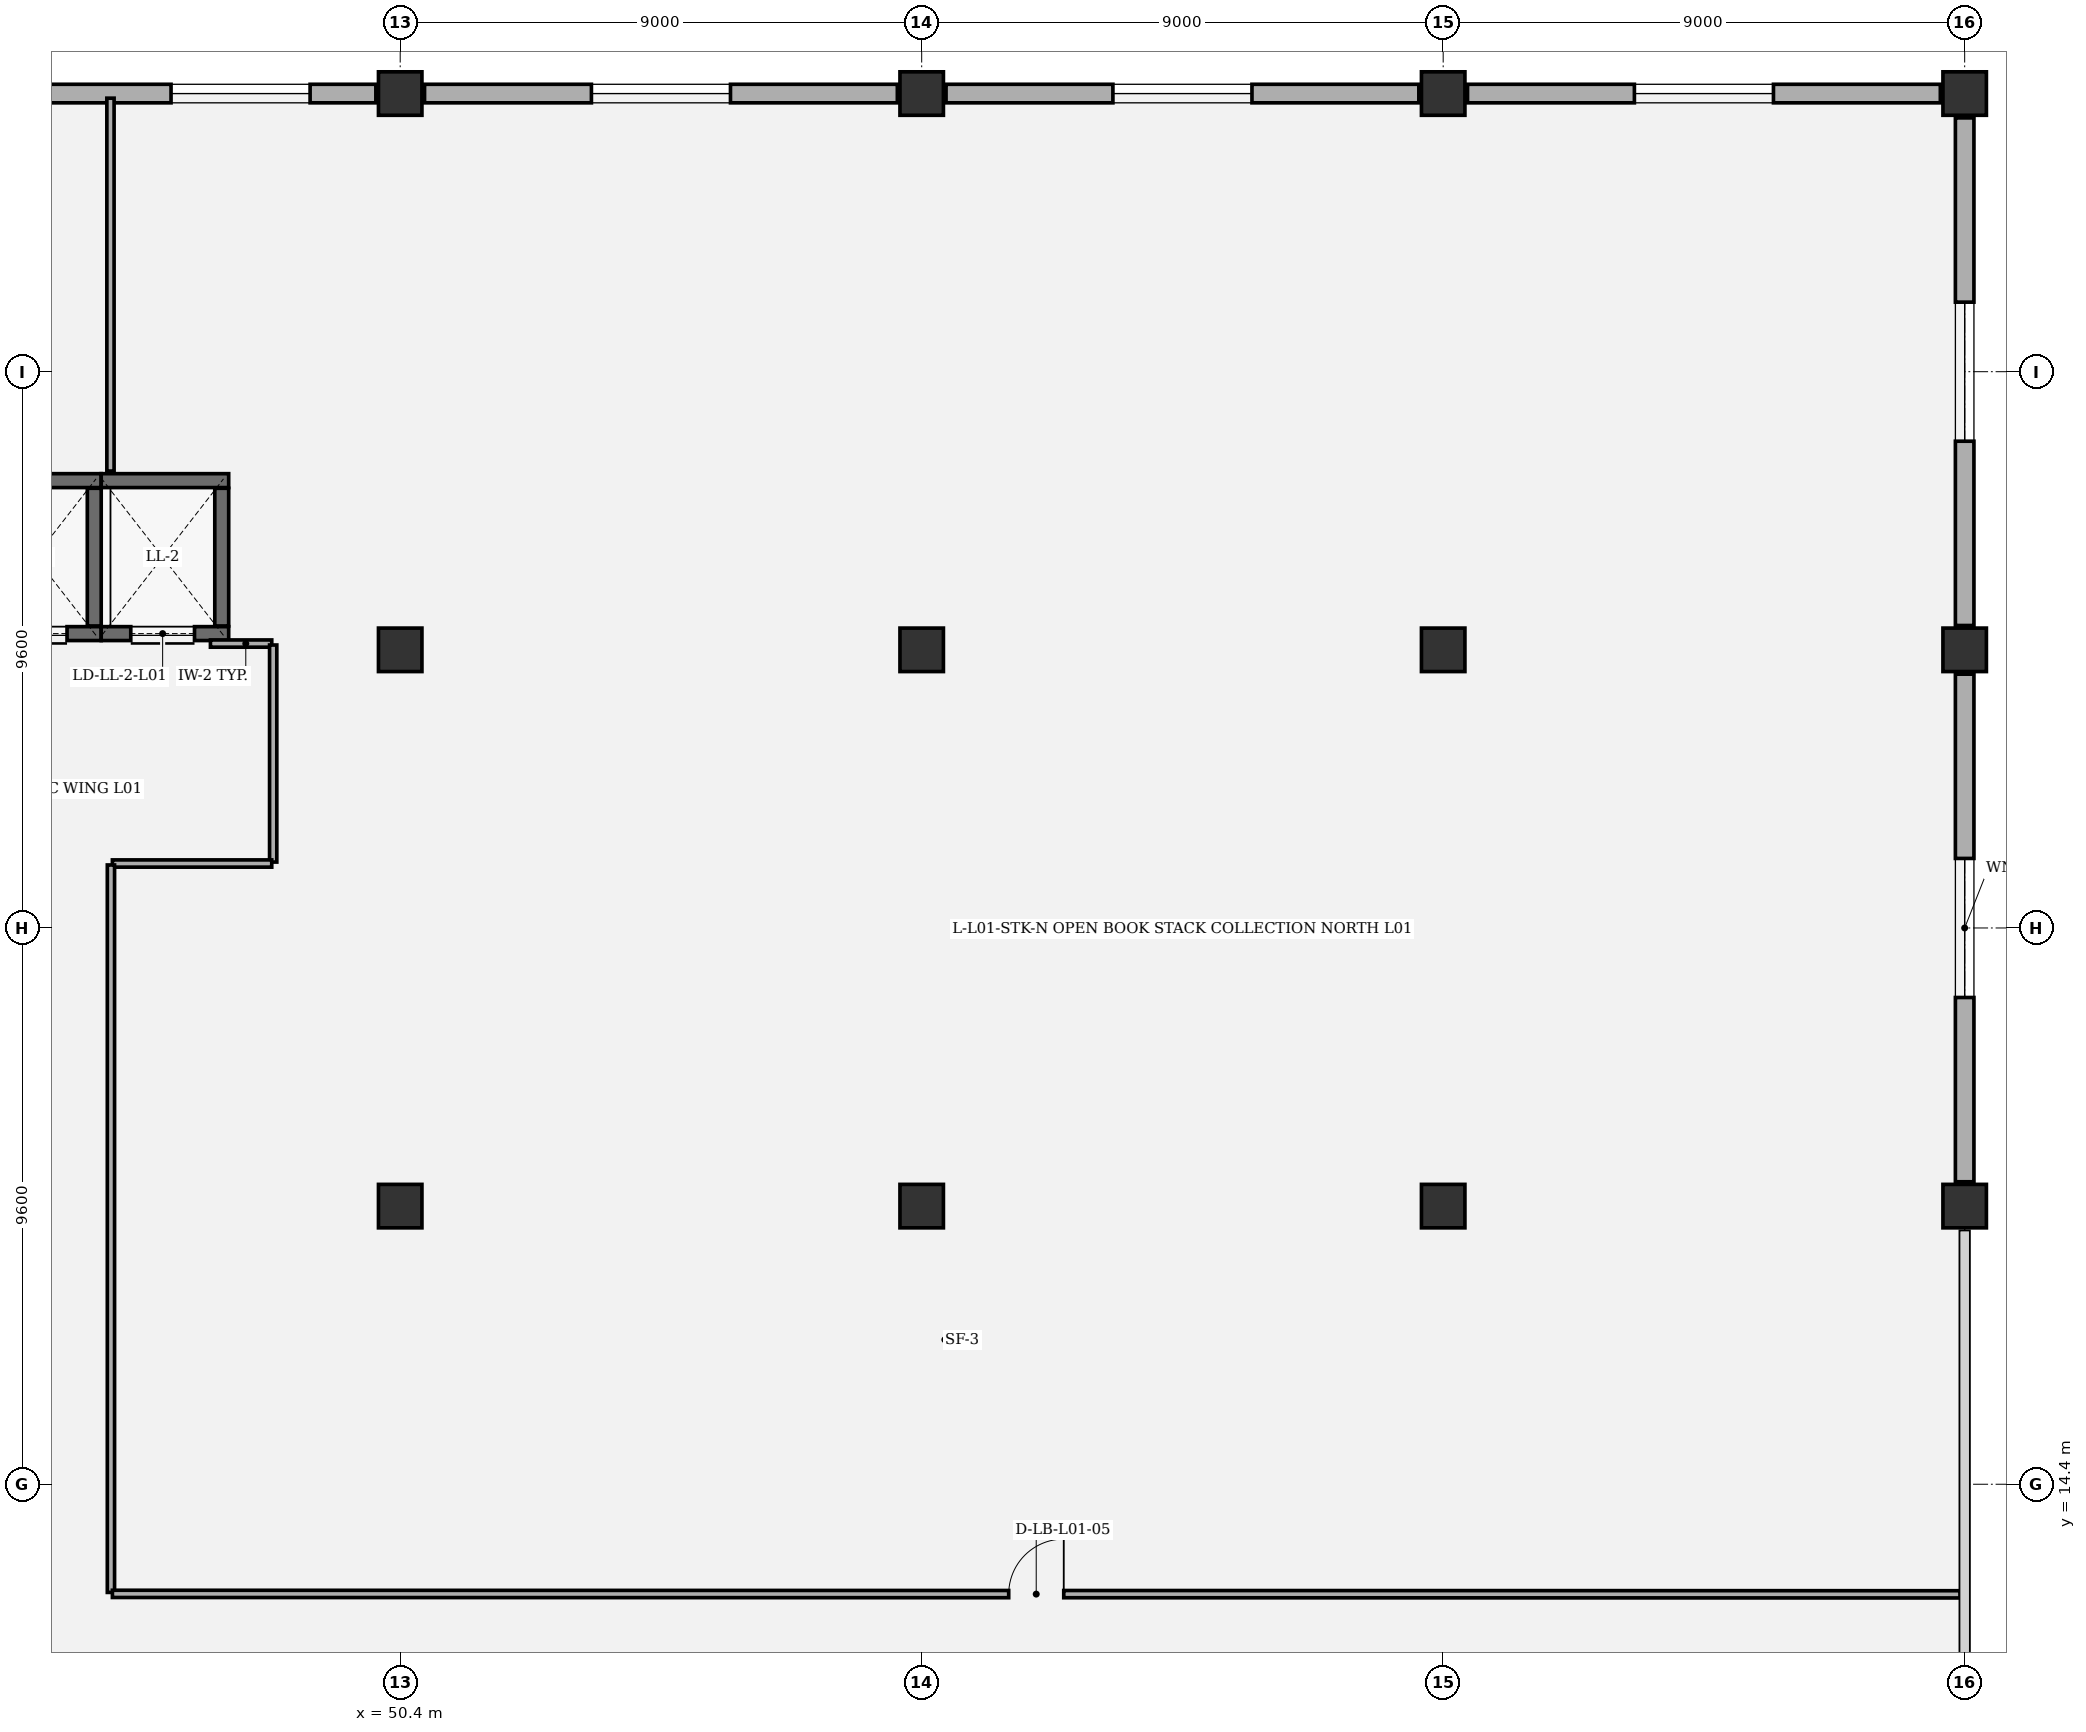
"""IFC4 building model, lengths in metres.
Left out: names, types, materials, properties, quantities, classifications, styles, units other than length and angle.
Written with IfcOpenShell. Run it as: python <this file> out.ifc"""

import sys

from ifc_helpers import new_model, si_unit, direction, frame, frame_2d, origin, origin_2d, place, context, subcontext, project, spatial, rectangle, extrude, element, fill, save


model = new_model("IFC4")
c1 = context("Model", 3, precision=1e-05, world=origin(), true_north=direction((0.0, 1.0)))
c2 = subcontext(c1, "Body", "Model", "MODEL_VIEW")
j1 = project(units=[si_unit("LENGTHUNIT", "METRE"), si_unit("PLANEANGLEUNIT", "RADIAN")], contexts=[c1])
p1 = place(None, origin())
s1 = spatial("IfcSite", under=j1, at=p1, CompositionType="ELEMENT")
p2 = place(p1, origin())
s2 = spatial("IfcBuilding", under=s1, at=p2, CompositionType="ELEMENT")
p3 = place(p2, frame((0.0, 0.0, 6.6)))
s3 = spatial("IfcBuildingStorey", under=s2, at=p3, CompositionType="ELEMENT", Elevation=6.6)
for number, where, z_axis, x_axis in (
    (1, (50.4, 19.2, 0.0), (0.0, 0.0, 1.0), (1.0, 0.0, 0.0)),
    (2, (50.4, 28.8, 0.0), (0.0, 0.0, 1.0), (1.0, 0.0, 0.0)),
    (3, (50.4, 38.4, 0.0), (0.0, 0.0, 1.0), (1.0, 0.0, 0.0)),
    (4, (59.4, 19.2, 0.0), (0.0, 0.0, 1.0), (1.0, 0.0, 0.0)),
    (5, (59.4, 28.8, 0.0), (0.0, 0.0, 1.0), (1.0, 0.0, 0.0)),
    (6, (59.4, 38.4, 0.0), (0.0, 0.0, 1.0), (1.0, 0.0, 0.0)),
    (7, (68.4, 19.2, 0.0), (0.0, 0.0, 1.0), (1.0, 0.0, 0.0)),
    (8, (68.4, 28.8, 0.0), (0.0, 0.0, 1.0), (1.0, 0.0, 0.0)),
    (9, (68.4, 38.4, 0.0), (0.0, 0.0, 1.0), (1.0, 0.0, 0.0)),
    (10, (77.4, 19.2, 0.0), (0.0, 0.0, 1.0), (1.0, 0.0, 0.0)),
    (11, (77.4, 28.8, 0.0), (0.0, 0.0, 1.0), (1.0, 0.0, 0.0)),
    (12, (77.4, 38.4, 0.0), (0.0, 0.0, 1.0), (1.0, 0.0, 0.0)),
):
    element("IfcColumn", number, at=place(p3, frame(where, z_axis=z_axis, x_axis=x_axis)), inside=s3, PredefinedType="COLUMN", context=c2, shape_type="SweptSolid", body=[
        extrude(rectangle(XDim=0.75, YDim=0.75, at=origin_2d()), origin(), (0.0, 0.0, 1.0), 5.4),
    ])
p4 = place(p3, frame((77.4, 28.38, 0.0), z_axis=(0.0, 0.0, 1.0), x_axis=(0.0, -1.0, 0.0)))
e13 = element("IfcWall", 13, at=p4, inside=s3, PredefinedType="SOLIDWALL", context=c2, shape_type="SweptSolid", body=[
    extrude(rectangle(XDim=8.76, YDim=0.32, at=frame_2d((4.38, 0.0))), origin(), (0.0, 0.0, 1.0), 4.337),
])
p5 = place(p4, frame((3.18, 0.0, 0.8)))
e14 = element("IfcOpeningElement", 14, at=p5, cuts=e13, PredefinedType="OPENING", context=c2, shape_type="SweptSolid", body=[
    extrude(rectangle(XDim=2.4, YDim=1.65, at=frame_2d((1.2, 0.825))), frame((0.0, 0.17, 0.0), z_axis=(0.0, -1.0, 0.0), x_axis=(1.0, 0.0, 0.0)), (0.0, 0.0, 1.0), 0.34),
])
p6 = place(p3, frame((77.4, 37.98, 0.0), z_axis=(0.0, 0.0, 1.0), x_axis=(0.0, -1.0, 0.0)))
e15 = element("IfcWall", 15, at=p6, inside=s3, PredefinedType="SOLIDWALL", context=c2, shape_type="SweptSolid", body=[
    extrude(rectangle(XDim=8.76, YDim=0.32, at=frame_2d((4.38, 0.0))), origin(), (0.0, 0.0, 1.0), 4.337),
])
p7 = place(p6, frame((3.18, 0.0, 0.8)))
e16 = element("IfcOpeningElement", 16, at=p7, cuts=e15, PredefinedType="OPENING", context=c2, shape_type="SweptSolid", body=[
    extrude(rectangle(XDim=2.4, YDim=1.65, at=frame_2d((1.2, 0.825))), frame((0.0, 0.17, 0.0), z_axis=(0.0, -1.0, 0.0), x_axis=(1.0, 0.0, 0.0)), (0.0, 0.0, 1.0), 0.34),
])
p8 = place(p3, frame((68.82, 38.4, 0.0), z_axis=(0.0, 0.0, 1.0), x_axis=(1.0, 0.0, 0.0)))
e17 = element("IfcWall", 17, at=p8, inside=s3, PredefinedType="SOLIDWALL", context=c2, shape_type="SweptSolid", body=[
    extrude(rectangle(XDim=8.16, YDim=0.32, at=frame_2d((4.08, 0.0))), origin(), (0.0, 0.0, 1.0), 4.337),
])
p9 = place(p8, frame((2.88, 0.0, 0.8)))
e18 = element("IfcOpeningElement", 18, at=p9, cuts=e17, PredefinedType="OPENING", context=c2, shape_type="SweptSolid", body=[
    extrude(rectangle(XDim=2.4, YDim=1.65, at=frame_2d((1.2, 0.825))), frame((0.0, 0.17, 0.0), z_axis=(0.0, -1.0, 0.0), x_axis=(1.0, 0.0, 0.0)), (0.0, 0.0, 1.0), 0.34),
])
p10 = place(p3, frame((59.82, 38.4, 0.0), z_axis=(0.0, 0.0, 1.0), x_axis=(1.0, 0.0, 0.0)))
e19 = element("IfcWall", 19, at=p10, inside=s3, PredefinedType="SOLIDWALL", context=c2, shape_type="SweptSolid", body=[
    extrude(rectangle(XDim=8.16, YDim=0.32, at=frame_2d((4.08, 0.0))), origin(), (0.0, 0.0, 1.0), 4.337),
])
p11 = place(p10, frame((2.88, 0.0, 0.8)))
e20 = element("IfcOpeningElement", 20, at=p11, cuts=e19, PredefinedType="OPENING", context=c2, shape_type="SweptSolid", body=[
    extrude(rectangle(XDim=2.4, YDim=1.65, at=frame_2d((1.2, 0.825))), frame((0.0, 0.17, 0.0), z_axis=(0.0, -1.0, 0.0), x_axis=(1.0, 0.0, 0.0)), (0.0, 0.0, 1.0), 0.34),
])
p12 = place(p3, frame((50.82, 38.4, 0.0), z_axis=(0.0, 0.0, 1.0), x_axis=(1.0, 0.0, 0.0)))
e21 = element("IfcWall", 21, at=p12, inside=s3, PredefinedType="SOLIDWALL", context=c2, shape_type="SweptSolid", body=[
    extrude(rectangle(XDim=8.16, YDim=0.32, at=frame_2d((4.08, 0.0))), origin(), (0.0, 0.0, 1.0), 4.337),
])
p13 = place(p12, frame((2.88, 0.0, 0.8)))
e22 = element("IfcOpeningElement", 22, at=p13, cuts=e21, PredefinedType="OPENING", context=c2, shape_type="SweptSolid", body=[
    extrude(rectangle(XDim=2.4, YDim=1.65, at=frame_2d((1.2, 0.825))), frame((0.0, 0.17, 0.0), z_axis=(0.0, -1.0, 0.0), x_axis=(1.0, 0.0, 0.0)), (0.0, 0.0, 1.0), 0.34),
])
p14 = place(p3, frame((41.82, 38.4, 0.0), z_axis=(0.0, 0.0, 1.0), x_axis=(1.0, 0.0, 0.0)))
e23 = element("IfcWall", 23, at=p14, inside=s3, PredefinedType="SOLIDWALL", context=c2, shape_type="SweptSolid", body=[
    extrude(rectangle(XDim=8.16, YDim=0.32, at=frame_2d((4.08, 0.0))), origin(), (0.0, 0.0, 1.0), 4.337),
])
p15 = place(p14, frame((4.625, 0.0, 0.8)))
e24 = element("IfcOpeningElement", 24, at=p15, cuts=e23, PredefinedType="OPENING", context=c2, shape_type="SweptSolid", body=[
    extrude(rectangle(XDim=2.4, YDim=1.65, at=frame_2d((1.2, 0.825))), frame((0.0, 0.17, 0.0), z_axis=(0.0, -1.0, 0.0), x_axis=(1.0, 0.0, 0.0)), (0.0, 0.0, 1.0), 0.34),
])
p16 = place(p3, frame((45.24, 29.08, 0.0), z_axis=(0.0, 0.0, 1.0), x_axis=(-1.0, 0.0, 0.0)))
e25 = element("IfcWall", 25, at=p16, inside=s3, PredefinedType="SHEAR", context=c2, shape_type="SweptSolid", body=[
    extrude(rectangle(XDim=2.28, YDim=0.24, at=frame_2d((1.14, 0.0))), origin(), (0.0, 0.0, 1.0), 5.14),
])
p17 = place(p16, frame((0.59, 0.0, 0.0)))
e26 = element("IfcOpeningElement", 26, at=p17, cuts=e25, PredefinedType="OPENING", context=c2, shape_type="SweptSolid", body=[
    extrude(rectangle(XDim=1.1, YDim=2.2, at=frame_2d((0.55, 1.1))), frame((0.0, 0.13, 0.0), z_axis=(0.0, -1.0, 0.0), x_axis=(1.0, 0.0, 0.0)), (0.0, 0.0, 1.0), 0.26),
])
p18 = place(p3, frame((42.96, 31.72, 0.0), z_axis=(0.0, 0.0, 1.0), x_axis=(1.0, 0.0, 0.0)))
e27 = element("IfcWall", 27, at=p18, inside=s3, PredefinedType="SHEAR", context=c2, shape_type="SweptSolid", body=[
    extrude(rectangle(XDim=2.28, YDim=0.24, at=frame_2d((1.14, 0.0))), origin(), (0.0, 0.0, 1.0), 5.14),
])
p19 = place(p3, frame((45.12, 31.588, 0.0), z_axis=(0.0, 0.0, 1.0), x_axis=(0.0, -1.0, 0.0)))
e28 = element("IfcWall", 28, at=p19, inside=s3, PredefinedType="SHEAR", context=c2, shape_type="SweptSolid", body=[
    extrude(rectangle(XDim=2.376, YDim=0.24, at=frame_2d((1.188, 0.0))), origin(), (0.0, 0.0, 1.0), 5.14),
])
p20 = place(p3, frame((47.44, 29.08, 0.0), z_axis=(0.0, 0.0, 1.0), x_axis=(-1.0, 0.0, 0.0)))
e29 = element("IfcWall", 29, at=p20, inside=s3, PredefinedType="SHEAR", context=c2, shape_type="SweptSolid", body=[
    extrude(rectangle(XDim=2.2, YDim=0.24, at=frame_2d((1.1, 0.0))), origin(), (0.0, 0.0, 1.0), 5.14),
])
p21 = place(p20, frame((0.59, 0.0, 0.0)))
e30 = element("IfcOpeningElement", 30, at=p21, cuts=e29, PredefinedType="OPENING", context=c2, shape_type="SweptSolid", body=[
    extrude(rectangle(XDim=1.1, YDim=2.2, at=frame_2d((0.55, 1.1))), frame((0.0, 0.13, 0.0), z_axis=(0.0, -1.0, 0.0), x_axis=(1.0, 0.0, 0.0)), (0.0, 0.0, 1.0), 0.26),
])
p22 = place(p3, frame((45.24, 31.72, 0.0), z_axis=(0.0, 0.0, 1.0), x_axis=(1.0, 0.0, 0.0)))
e31 = element("IfcWall", 31, at=p22, inside=s3, PredefinedType="SHEAR", context=c2, shape_type="SweptSolid", body=[
    extrude(rectangle(XDim=2.2, YDim=0.24, at=frame_2d((1.1, 0.0))), origin(), (0.0, 0.0, 1.0), 5.14),
])
p23 = place(p3, frame((47.32, 31.588, 0.0), z_axis=(0.0, 0.0, 1.0), x_axis=(0.0, -1.0, 0.0)))
e32 = element("IfcWall", 32, at=p23, inside=s3, PredefinedType="SHEAR", context=c2, shape_type="SweptSolid", body=[
    extrude(rectangle(XDim=2.376, YDim=0.24, at=frame_2d((1.188, 0.0))), origin(), (0.0, 0.0, 1.0), 5.14),
])
p24 = place(p3, frame((48.183, 28.908, 0.0), z_axis=(0.0, 0.0, 1.0), x_axis=(-1.0, 0.0, 0.0)))
e33 = element("IfcWall", 33, at=p24, inside=s3, PredefinedType="PARTITIONING", context=c2, shape_type="SweptSolid", body=[
    extrude(rectangle(XDim=1.058, YDim=0.125, at=frame_2d((0.529, 0.0))), origin(), (0.0, 0.0, 1.0), 4.414),
])
p25 = place(p3, frame((48.208, 28.883, 0.0), z_axis=(0.0, 0.0, 1.0), x_axis=(0.0, -1.0, 0.0)))
e34 = element("IfcWall", 34, at=p25, inside=s3, PredefinedType="PARTITIONING", context=c2, shape_type="SweptSolid", body=[
    extrude(rectangle(XDim=3.746, YDim=0.125, at=frame_2d((1.873, 0.0))), origin(), (0.0, 0.0, 1.0), 5.14),
])
p26 = place(p3, frame((45.433, 25.112, 0.0), z_axis=(0.0, 0.0, 1.0), x_axis=(1.0, 0.0, 0.0)))
e35 = element("IfcWall", 35, at=p26, inside=s3, PredefinedType="PARTITIONING", context=c2, shape_type="SweptSolid", body=[
    extrude(rectangle(XDim=2.75, YDim=0.125, at=frame_2d((1.375, 0.0))), origin(), (0.0, 0.0, 1.0), 5.14),
])
p27 = place(p3, frame((45.408, 25.087, 0.0), z_axis=(0.0, 0.0, 1.0), x_axis=(0.0, -1.0, 0.0)))
e36 = element("IfcWall", 36, at=p27, inside=s3, PredefinedType="PARTITIONING", context=c2, shape_type="SweptSolid", body=[
    extrude(rectangle(XDim=12.554, YDim=0.125, at=frame_2d((6.277, 0.0))), origin(), (0.0, 0.0, 1.0), 5.14),
])
p28 = place(p3, frame((45.433, 12.508, 0.0), z_axis=(0.0, 0.0, 1.0), x_axis=(0.999999968081, -0.000252662519, 0.0)))
e37 = element("IfcWall", 37, at=p28, inside=s3, PredefinedType="PARTITIONING", context=c2, shape_type="SweptSolid", body=[
    extrude(rectangle(XDim=31.887, YDim=0.125, at=frame_2d((15.943, 0.0))), origin(), (0.0, 0.0, 1.0), 5.14),
])
p29 = place(p28, frame((15.469, 0.0, 0.0)))
e38 = element("IfcOpeningElement", 38, at=p29, cuts=e37, PredefinedType="OPENING", context=c2, shape_type="SweptSolid", body=[
    extrude(rectangle(XDim=0.95, YDim=2.15, at=frame_2d((0.475, 1.075))), frame((0.0, 0.073, 0.0), z_axis=(0.0, -1.0, 0.0), x_axis=(1.0, 0.0, 0.0)), (0.0, 0.0, 1.0), 0.145),
])
p30 = place(p3, frame((45.4, 38.32, 0.0), z_axis=(0.0, 0.0, 1.0), x_axis=(0.0, -1.0, 0.0)))
e39 = element("IfcWall", 39, at=p30, inside=s3, PredefinedType="PARTITIONING", context=c2, shape_type="SweptSolid", body=[
    extrude(rectangle(XDim=6.435, YDim=0.125, at=frame_2d((3.218, 0.0))), origin(), (0.0, 0.0, 1.0), 5.14),
])
p31 = place(p5, origin())
e40 = element("IfcWindow", 40, at=p31, inside=s3, PartitioningType="SINGLE_PANEL", PredefinedType="WINDOW", context=c2, shape_type="SweptSolid", body=[
    extrude(rectangle(XDim=2.4, YDim=1.65, at=frame_2d((1.2, 0.825))), frame((0.0, 0.03, 0.0), z_axis=(0.0, -1.0, 0.0), x_axis=(1.0, 0.0, 0.0)), (0.0, 0.0, 1.0), 0.06),
])
fill(e14, e40)
p32 = place(p7, origin())
e41 = element("IfcWindow", 41, at=p32, inside=s3, PartitioningType="SINGLE_PANEL", PredefinedType="WINDOW", context=c2, shape_type="SweptSolid", body=[
    extrude(rectangle(XDim=2.4, YDim=1.65, at=frame_2d((1.2, 0.825))), frame((0.0, 0.03, 0.0), z_axis=(0.0, -1.0, 0.0), x_axis=(1.0, 0.0, 0.0)), (0.0, 0.0, 1.0), 0.06),
])
fill(e16, e41)
p33 = place(p9, origin())
e42 = element("IfcWindow", 42, at=p33, inside=s3, PartitioningType="SINGLE_PANEL", PredefinedType="WINDOW", context=c2, shape_type="SweptSolid", body=[
    extrude(rectangle(XDim=2.4, YDim=1.65, at=frame_2d((1.2, 0.825))), frame((0.0, 0.03, 0.0), z_axis=(0.0, -1.0, 0.0), x_axis=(1.0, 0.0, 0.0)), (0.0, 0.0, 1.0), 0.06),
])
fill(e18, e42)
p34 = place(p11, origin())
e43 = element("IfcWindow", 43, at=p34, inside=s3, PartitioningType="SINGLE_PANEL", PredefinedType="WINDOW", context=c2, shape_type="SweptSolid", body=[
    extrude(rectangle(XDim=2.4, YDim=1.65, at=frame_2d((1.2, 0.825))), frame((0.0, 0.03, 0.0), z_axis=(0.0, -1.0, 0.0), x_axis=(1.0, 0.0, 0.0)), (0.0, 0.0, 1.0), 0.06),
])
fill(e20, e43)
p35 = place(p13, origin())
e44 = element("IfcWindow", 44, at=p35, inside=s3, PartitioningType="SINGLE_PANEL", PredefinedType="WINDOW", context=c2, shape_type="SweptSolid", body=[
    extrude(rectangle(XDim=2.4, YDim=1.65, at=frame_2d((1.2, 0.825))), frame((0.0, 0.03, 0.0), z_axis=(0.0, -1.0, 0.0), x_axis=(1.0, 0.0, 0.0)), (0.0, 0.0, 1.0), 0.06),
])
fill(e22, e44)
p36 = place(p15, origin())
e45 = element("IfcWindow", 45, at=p36, inside=s3, PartitioningType="SINGLE_PANEL", PredefinedType="WINDOW", context=c2, shape_type="SweptSolid", body=[
    extrude(rectangle(XDim=2.4, YDim=1.65, at=frame_2d((1.2, 0.825))), frame((0.0, 0.03, 0.0), z_axis=(0.0, -1.0, 0.0), x_axis=(1.0, 0.0, 0.0)), (0.0, 0.0, 1.0), 0.06),
])
fill(e24, e45)
p37 = place(p17, origin())
e46 = element("IfcDoor", 46, at=p37, inside=s3, OperationType="DOUBLE_DOOR_SLIDING", PredefinedType="DOOR", context=c2, shape_type="SweptSolid", body=[
    extrude(rectangle(XDim=1.1, YDim=2.2, at=frame_2d((0.55, 1.1))), frame((0.0, 0.025, 0.0), z_axis=(0.0, -1.0, 0.0), x_axis=(1.0, 0.0, 0.0)), (0.0, 0.0, 1.0), 0.05),
])
fill(e26, e46)
p38 = place(p21, origin())
e47 = element("IfcDoor", 47, at=p38, inside=s3, OperationType="DOUBLE_DOOR_SLIDING", PredefinedType="DOOR", context=c2, shape_type="SweptSolid", body=[
    extrude(rectangle(XDim=1.1, YDim=2.2, at=frame_2d((0.55, 1.1))), frame((0.0, 0.025, 0.0), z_axis=(0.0, -1.0, 0.0), x_axis=(1.0, 0.0, 0.0)), (0.0, 0.0, 1.0), 0.05),
])
fill(e30, e47)
p39 = place(p29, origin())
e48 = element("IfcDoor", 48, at=p39, inside=s3, OperationType="SINGLE_SWING_RIGHT", PredefinedType="DOOR", context=c2, shape_type="SweptSolid", body=[
    extrude(rectangle(XDim=0.95, YDim=2.15, at=frame_2d((0.475, 1.075))), frame((0.0, 0.025, 0.0), z_axis=(0.0, -1.0, 0.0), x_axis=(1.0, 0.0, 0.0)), (0.0, 0.0, 1.0), 0.05),
])
fill(e38, e48)
save(model, sys.argv[1])
